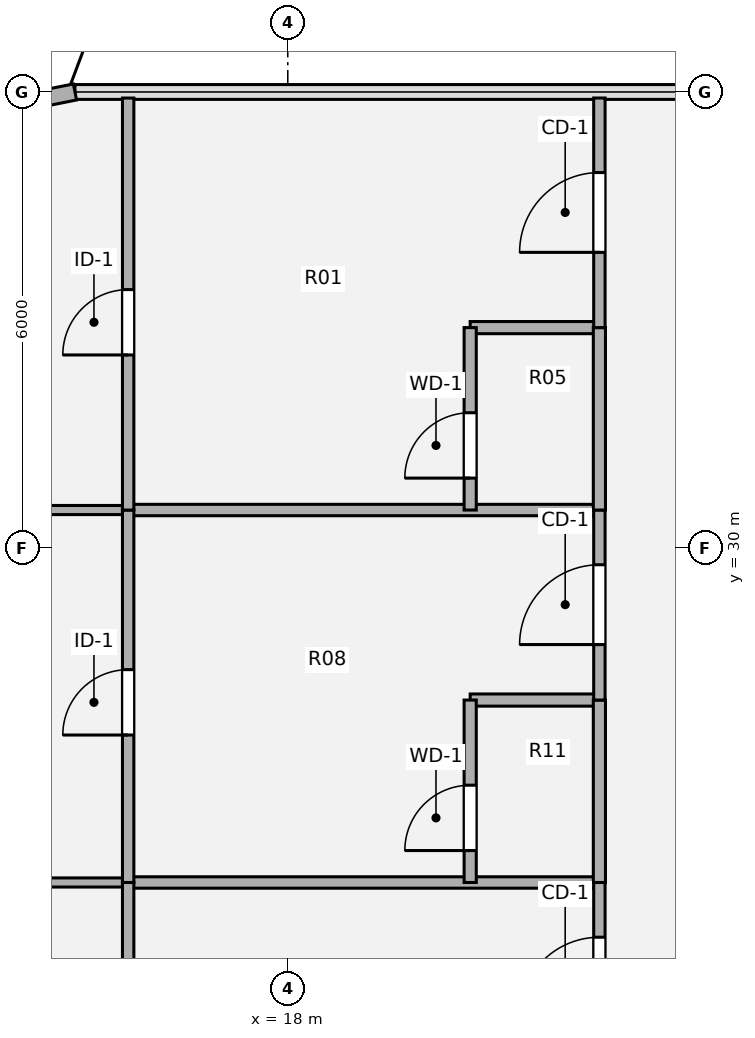
"""IFC4 building model, lengths in metres.
Left out: names, types, materials, properties, quantities, classifications, styles, units other than length and angle.
Written with IfcOpenShell. Run it as: python <this file> out.ifc"""

import sys

from ifc_helpers import new_model, si_unit, direction, frame, frame_2d, origin, origin_2d, place, context, subcontext, project, spatial, rectangle, extrude, source, transform, mapped, element, fill, save


model = new_model("IFC4")
c1 = context("Model", 3, precision=1e-05, world=origin(), true_north=direction((0.0, 1.0)))
c2 = subcontext(c1, "Body", "Model", "MODEL_VIEW")
j1 = project(units=[si_unit("LENGTHUNIT", "METRE"), si_unit("PLANEANGLEUNIT", "RADIAN")], contexts=[c1])
p1 = place(None, origin())
s1 = spatial("IfcSite", under=j1, at=p1, CompositionType="ELEMENT")
p2 = place(p1, origin())
s2 = spatial("IfcBuilding", under=s1, at=p2, CompositionType="ELEMENT")
p3 = place(p2, frame((0.0, 0.0, 64.8)))
s3 = spatial("IfcBuildingStorey", under=s2, at=p3, CompositionType="ELEMENT", Elevation=64.8)
p4 = place(p3, frame((13.975, 35.756, 0.0), z_axis=(0.0, 0.0, 1.0), x_axis=(0.980775717779, 0.195138390419, 0.0)))
e1 = element("IfcWall", 1, at=p4, inside=s3, PredefinedType="SOLIDWALL", context=c2, shape_type="SweptSolid", body=[
    extrude(rectangle(XDim=1.249, YDim=0.215, at=frame_2d((0.624, 0.0))), origin(), (0.0, 0.0, 1.0), 3.53),
])
p5 = place(p3, frame((12.08, 25.6, 0.0), z_axis=(0.0, 0.0, 1.0), x_axis=(1.0, 0.0, 0.0)))
e2 = element("IfcWall", 2, at=p5, inside=s3, PredefinedType="PARTITIONING", context=c2, shape_type="SweptSolid", body=[
    extrude(rectangle(XDim=3.82, YDim=0.12, at=frame_2d((1.91, 0.0))), origin(), (0.0, 0.0, 1.0), 2.982),
])
p6 = place(p3, frame((15.9, 25.6, 0.0), z_axis=(0.0, 0.0, 1.0), x_axis=(1.0, 0.0, 0.0)))
e3 = element("IfcWall", 3, at=p6, inside=s3, PredefinedType="PARTITIONING", context=c2, shape_type="SweptSolid", body=[
    extrude(rectangle(XDim=6.2, YDim=0.15, at=frame_2d((3.1, 0.0))), origin(), (0.0, 0.0, 1.0), 2.982),
])
p7 = place(p3, frame((20.4, 28.0, 0.0), z_axis=(0.0, 0.0, 1.0), x_axis=(1.0, 0.0, 0.0)))
e4 = element("IfcWall", 4, at=p7, inside=s3, PredefinedType="PLUMBINGWALL", context=c2, shape_type="SweptSolid", body=[
    extrude(rectangle(XDim=1.7, YDim=0.16, at=frame_2d((0.85, 0.0))), origin(), (0.0, 0.0, 1.0), 2.982),
])
p8 = place(p3, frame((12.08, 30.5, 0.0), z_axis=(0.0, 0.0, 1.0), x_axis=(1.0, 0.0, 0.0)))
e5 = element("IfcWall", 5, at=p8, inside=s3, PredefinedType="PARTITIONING", context=c2, shape_type="SweptSolid", body=[
    extrude(rectangle(XDim=3.82, YDim=0.12, at=frame_2d((1.91, 0.0))), origin(), (0.0, 0.0, 1.0), 2.903),
])
p9 = place(p3, frame((15.9, 30.5, 0.0), z_axis=(0.0, 0.0, 1.0), x_axis=(1.0, 0.0, 0.0)))
e6 = element("IfcWall", 6, at=p9, inside=s3, PredefinedType="PARTITIONING", context=c2, shape_type="SweptSolid", body=[
    extrude(rectangle(XDim=6.2, YDim=0.15, at=frame_2d((3.1, 0.0))), origin(), (0.0, 0.0, 1.0), 2.903),
])
p10 = place(p3, frame((20.4, 32.9, 0.0), z_axis=(0.0, 0.0, 1.0), x_axis=(1.0, 0.0, 0.0)))
e7 = element("IfcWall", 7, at=p10, inside=s3, PredefinedType="PLUMBINGWALL", context=c2, shape_type="SweptSolid", body=[
    extrude(rectangle(XDim=1.7, YDim=0.16, at=frame_2d((0.85, 0.0))), origin(), (0.0, 0.0, 1.0), 3.055),
])
p11 = place(p3, frame((15.9, 20.7, 0.0), z_axis=(0.0, 0.0, 1.0), x_axis=(0.0, 1.0, 0.0)))
e8 = element("IfcWall", 8, at=p11, inside=s3, PredefinedType="PARTITIONING", context=c2, shape_type="SweptSolid", body=[
    extrude(rectangle(XDim=4.9, YDim=0.15, at=frame_2d((2.45, 0.0))), origin(), (0.0, 0.0, 1.0), 3.5),
])
p12 = place(p11, frame((1.84, 0.0, 0.0)))
e9 = element("IfcOpeningElement", 9, at=p12, cuts=e8, PredefinedType="OPENING", context=c2, shape_type="SweptSolid", body=[
    extrude(rectangle(XDim=0.86, YDim=2.1, at=origin_2d()), frame((0.43, 0.085, 1.05), z_axis=(0.0, -1.0, 0.0), x_axis=(1.0, 0.0, 0.0)), (0.0, 0.0, 1.0), 0.17),
])
p13 = place(p3, frame((15.9, 25.6, 0.0), z_axis=(0.0, 0.0, 1.0), x_axis=(0.0, 1.0, 0.0)))
e10 = element("IfcWall", 10, at=p13, inside=s3, PredefinedType="PARTITIONING", context=c2, shape_type="SweptSolid", body=[
    extrude(rectangle(XDim=4.9, YDim=0.15, at=frame_2d((2.45, 0.0))), origin(), (0.0, 0.0, 1.0), 3.5),
])
p14 = place(p13, frame((1.94, 0.0, 0.0)))
e11 = element("IfcOpeningElement", 11, at=p14, cuts=e10, PredefinedType="OPENING", context=c2, shape_type="SweptSolid", body=[
    extrude(rectangle(XDim=0.86, YDim=2.1, at=origin_2d()), frame((0.43, 0.085, 1.05), z_axis=(0.0, -1.0, 0.0), x_axis=(1.0, 0.0, 0.0)), (0.0, 0.0, 1.0), 0.17),
])
p15 = place(p3, frame((15.9, 30.5, 0.0), z_axis=(0.0, 0.0, 1.0), x_axis=(0.0, 1.0, 0.0)))
e12 = element("IfcWall", 12, at=p15, inside=s3, PredefinedType="PARTITIONING", context=c2, shape_type="SweptSolid", body=[
    extrude(rectangle(XDim=5.42, YDim=0.15, at=frame_2d((2.71, 0.0))), origin(), (0.0, 0.0, 1.0), 3.5),
])
p16 = place(p15, frame((2.04, 0.0, 0.0)))
e13 = element("IfcOpeningElement", 13, at=p16, cuts=e12, PredefinedType="OPENING", context=c2, shape_type="SweptSolid", body=[
    extrude(rectangle(XDim=0.86, YDim=2.1, at=origin_2d()), frame((0.43, 0.085, 1.05), z_axis=(0.0, -1.0, 0.0), x_axis=(1.0, 0.0, 0.0)), (0.0, 0.0, 1.0), 0.17),
])
p17 = place(p3, frame((20.4, 25.6, 0.0), z_axis=(0.0, 0.0, 1.0), x_axis=(0.0, 1.0, 0.0)))
e14 = element("IfcWall", 14, at=p17, inside=s3, PredefinedType="PLUMBINGWALL", context=c2, shape_type="SweptSolid", body=[
    extrude(rectangle(XDim=2.4, YDim=0.16, at=frame_2d((1.2, 0.0))), origin(), (0.0, 0.0, 1.0), 3.5),
])
p18 = place(p17, frame((0.42, 0.0, 0.0)))
e15 = element("IfcOpeningElement", 15, at=p18, cuts=e14, PredefinedType="OPENING", context=c2, shape_type="SweptSolid", body=[
    extrude(rectangle(XDim=0.86, YDim=2.1, at=origin_2d()), frame((0.43, 0.09, 1.05), z_axis=(0.0, -1.0, 0.0), x_axis=(1.0, 0.0, 0.0)), (0.0, 0.0, 1.0), 0.18),
])
p19 = place(p3, frame((20.4, 30.5, 0.0), z_axis=(0.0, 0.0, 1.0), x_axis=(0.0, 1.0, 0.0)))
e16 = element("IfcWall", 16, at=p19, inside=s3, PredefinedType="PLUMBINGWALL", context=c2, shape_type="SweptSolid", body=[
    extrude(rectangle(XDim=2.4, YDim=0.16, at=frame_2d((1.2, 0.0))), origin(), (0.0, 0.0, 1.0), 3.5),
])
p20 = place(p19, frame((0.42, 0.0, 0.0)))
e17 = element("IfcOpeningElement", 17, at=p20, cuts=e16, PredefinedType="OPENING", context=c2, shape_type="SweptSolid", body=[
    extrude(rectangle(XDim=0.86, YDim=2.1, at=origin_2d()), frame((0.43, 0.09, 1.05), z_axis=(0.0, -1.0, 0.0), x_axis=(1.0, 0.0, 0.0)), (0.0, 0.0, 1.0), 0.18),
])
p21 = place(p3, frame((22.1, 23.1, 0.0), z_axis=(0.0, 0.0, 1.0), x_axis=(0.0, 1.0, 0.0)))
e18 = element("IfcWall", 18, at=p21, inside=s3, PredefinedType="PARTITIONING", context=c2, shape_type="SweptSolid", body=[
    extrude(rectangle(XDim=2.5, YDim=0.15, at=frame_2d((1.25, 0.0))), origin(), (0.0, 0.0, 1.0), 3.5),
])
p22 = place(p21, frame((0.73, 0.0, 0.0)))
e19 = element("IfcOpeningElement", 19, at=p22, cuts=e18, PredefinedType="OPENING", context=c2, shape_type="SweptSolid", body=[
    extrude(rectangle(XDim=1.05, YDim=2.1, at=origin_2d()), frame((0.525, 0.085, 1.05), z_axis=(0.0, -1.0, 0.0), x_axis=(1.0, 0.0, 0.0)), (0.0, 0.0, 1.0), 0.17),
])
p23 = place(p3, frame((22.1, 25.6, 0.0), z_axis=(0.0, 0.0, 1.0), x_axis=(0.0, 1.0, 0.0)))
e20 = element("IfcWall", 20, at=p23, inside=s3, PredefinedType="PLUMBINGWALL", context=c2, shape_type="SweptSolid", body=[
    extrude(rectangle(XDim=2.4, YDim=0.16, at=frame_2d((1.2, 0.0))), origin(), (0.0, 0.0, 1.0), 3.5),
])
p24 = place(p3, frame((22.1, 28.0, 0.0), z_axis=(0.0, 0.0, 1.0), x_axis=(0.0, 1.0, 0.0)))
e21 = element("IfcWall", 21, at=p24, inside=s3, PredefinedType="PARTITIONING", context=c2, shape_type="SweptSolid", body=[
    extrude(rectangle(XDim=2.5, YDim=0.15, at=frame_2d((1.25, 0.0))), origin(), (0.0, 0.0, 1.0), 3.5),
])
p25 = place(p24, frame((0.73, 0.0, 0.0)))
e22 = element("IfcOpeningElement", 22, at=p25, cuts=e21, PredefinedType="OPENING", context=c2, shape_type="SweptSolid", body=[
    extrude(rectangle(XDim=1.05, YDim=2.1, at=origin_2d()), frame((0.525, 0.085, 1.05), z_axis=(0.0, -1.0, 0.0), x_axis=(1.0, 0.0, 0.0)), (0.0, 0.0, 1.0), 0.17),
])
p26 = place(p3, frame((22.1, 30.5, 0.0), z_axis=(0.0, 0.0, 1.0), x_axis=(0.0, 1.0, 0.0)))
e23 = element("IfcWall", 23, at=p26, inside=s3, PredefinedType="PLUMBINGWALL", context=c2, shape_type="SweptSolid", body=[
    extrude(rectangle(XDim=2.4, YDim=0.16, at=frame_2d((1.2, 0.0))), origin(), (0.0, 0.0, 1.0), 3.5),
])
p27 = place(p3, frame((22.1, 32.9, 0.0), z_axis=(0.0, 0.0, 1.0), x_axis=(0.0, 1.0, 0.0)))
e24 = element("IfcWall", 24, at=p27, inside=s3, PredefinedType="PARTITIONING", context=c2, shape_type="SweptSolid", body=[
    extrude(rectangle(XDim=3.021, YDim=0.15, at=frame_2d((1.51, 0.0))), origin(), (0.0, 0.0, 1.0), 3.5),
])
p28 = place(p27, frame((0.99, 0.0, 0.0)))
e25 = element("IfcOpeningElement", 25, at=p28, cuts=e24, PredefinedType="OPENING", context=c2, shape_type="SweptSolid", body=[
    extrude(rectangle(XDim=1.05, YDim=2.1, at=origin_2d()), frame((0.525, 0.085, 1.05), z_axis=(0.0, -1.0, 0.0), x_axis=(1.0, 0.0, 0.0)), (0.0, 0.0, 1.0), 0.17),
])
m1 = source(origin(), c2, "Body", "SweptSolid", [
    extrude(rectangle(XDim=0.86, YDim=2.1, at=origin_2d()), frame((0.43, 0.025, 1.05), z_axis=(0.0, -1.0, 0.0), x_axis=(1.0, 0.0, 0.0)), (0.0, 0.0, 1.0), 0.05),
])
p29 = place(p14, origin())
e26 = element("IfcDoor", 26, at=p29, inside=s3, OperationType="SINGLE_SWING_LEFT", PredefinedType="DOOR", context=c2, shape_type="MappedRepresentation", body=[
    mapped(m1, transform((0.0, 0.0, 0.0), x_axis=(1.0, 0.0, 0.0), y_axis=(0.0, 1.0, 0.0), z_axis=(0.0, 0.0, 1.0), scale=1.0)),
])
fill(e11, e26)
p30 = place(p16, origin())
e27 = element("IfcDoor", 27, at=p30, inside=s3, OperationType="SINGLE_SWING_LEFT", PredefinedType="DOOR", context=c2, shape_type="MappedRepresentation", body=[
    mapped(m1, transform((0.0, 0.0, 0.0), x_axis=(1.0, 0.0, 0.0), y_axis=(0.0, 1.0, 0.0), z_axis=(0.0, 0.0, 1.0), scale=1.0)),
])
fill(e13, e27)
m2 = source(origin(), c2, "Body", "SweptSolid", [
    extrude(rectangle(XDim=0.86, YDim=2.1, at=origin_2d()), frame((0.43, 0.025, 1.05), z_axis=(0.0, -1.0, 0.0), x_axis=(1.0, 0.0, 0.0)), (0.0, 0.0, 1.0), 0.05),
])
p31 = place(p18, origin())
e28 = element("IfcDoor", 28, at=p31, inside=s3, OperationType="SINGLE_SWING_LEFT", PredefinedType="DOOR", context=c2, shape_type="MappedRepresentation", body=[
    mapped(m2, transform((0.0, 0.0, 0.0), x_axis=(1.0, 0.0, 0.0), y_axis=(0.0, 1.0, 0.0), z_axis=(0.0, 0.0, 1.0), scale=1.0)),
])
fill(e15, e28)
p32 = place(p20, origin())
e29 = element("IfcDoor", 29, at=p32, inside=s3, OperationType="SINGLE_SWING_LEFT", PredefinedType="DOOR", context=c2, shape_type="MappedRepresentation", body=[
    mapped(m2, transform((0.0, 0.0, 0.0), x_axis=(1.0, 0.0, 0.0), y_axis=(0.0, 1.0, 0.0), z_axis=(0.0, 0.0, 1.0), scale=1.0)),
])
fill(e17, e29)
m3 = source(origin(), c2, "Body", "SweptSolid", [
    extrude(rectangle(XDim=1.05, YDim=2.1, at=origin_2d()), frame((0.525, 0.025, 1.05), z_axis=(0.0, -1.0, 0.0), x_axis=(1.0, 0.0, 0.0)), (0.0, 0.0, 1.0), 0.05),
])
p33 = place(p22, origin())
e30 = element("IfcDoor", 30, at=p33, inside=s3, OperationType="SINGLE_SWING_LEFT", PredefinedType="DOOR", context=c2, shape_type="MappedRepresentation", body=[
    mapped(m3, transform((0.0, 0.0, 0.0), x_axis=(1.0, 0.0, 0.0), y_axis=(0.0, 1.0, 0.0), z_axis=(0.0, 0.0, 1.0), scale=1.0)),
])
fill(e19, e30)
p34 = place(p25, origin())
e31 = element("IfcDoor", 31, at=p34, inside=s3, OperationType="SINGLE_SWING_LEFT", PredefinedType="DOOR", context=c2, shape_type="MappedRepresentation", body=[
    mapped(m3, transform((0.0, 0.0, 0.0), x_axis=(1.0, 0.0, 0.0), y_axis=(0.0, 1.0, 0.0), z_axis=(0.0, 0.0, 1.0), scale=1.0)),
])
fill(e22, e31)
p35 = place(p28, origin())
e32 = element("IfcDoor", 32, at=p35, inside=s3, OperationType="SINGLE_SWING_LEFT", PredefinedType="DOOR", context=c2, shape_type="MappedRepresentation", body=[
    mapped(m3, transform((0.0, 0.0, 0.0), x_axis=(1.0, 0.0, 0.0), y_axis=(0.0, 1.0, 0.0), z_axis=(0.0, 0.0, 1.0), scale=1.0)),
])
fill(e25, e32)
save(model, sys.argv[1])
